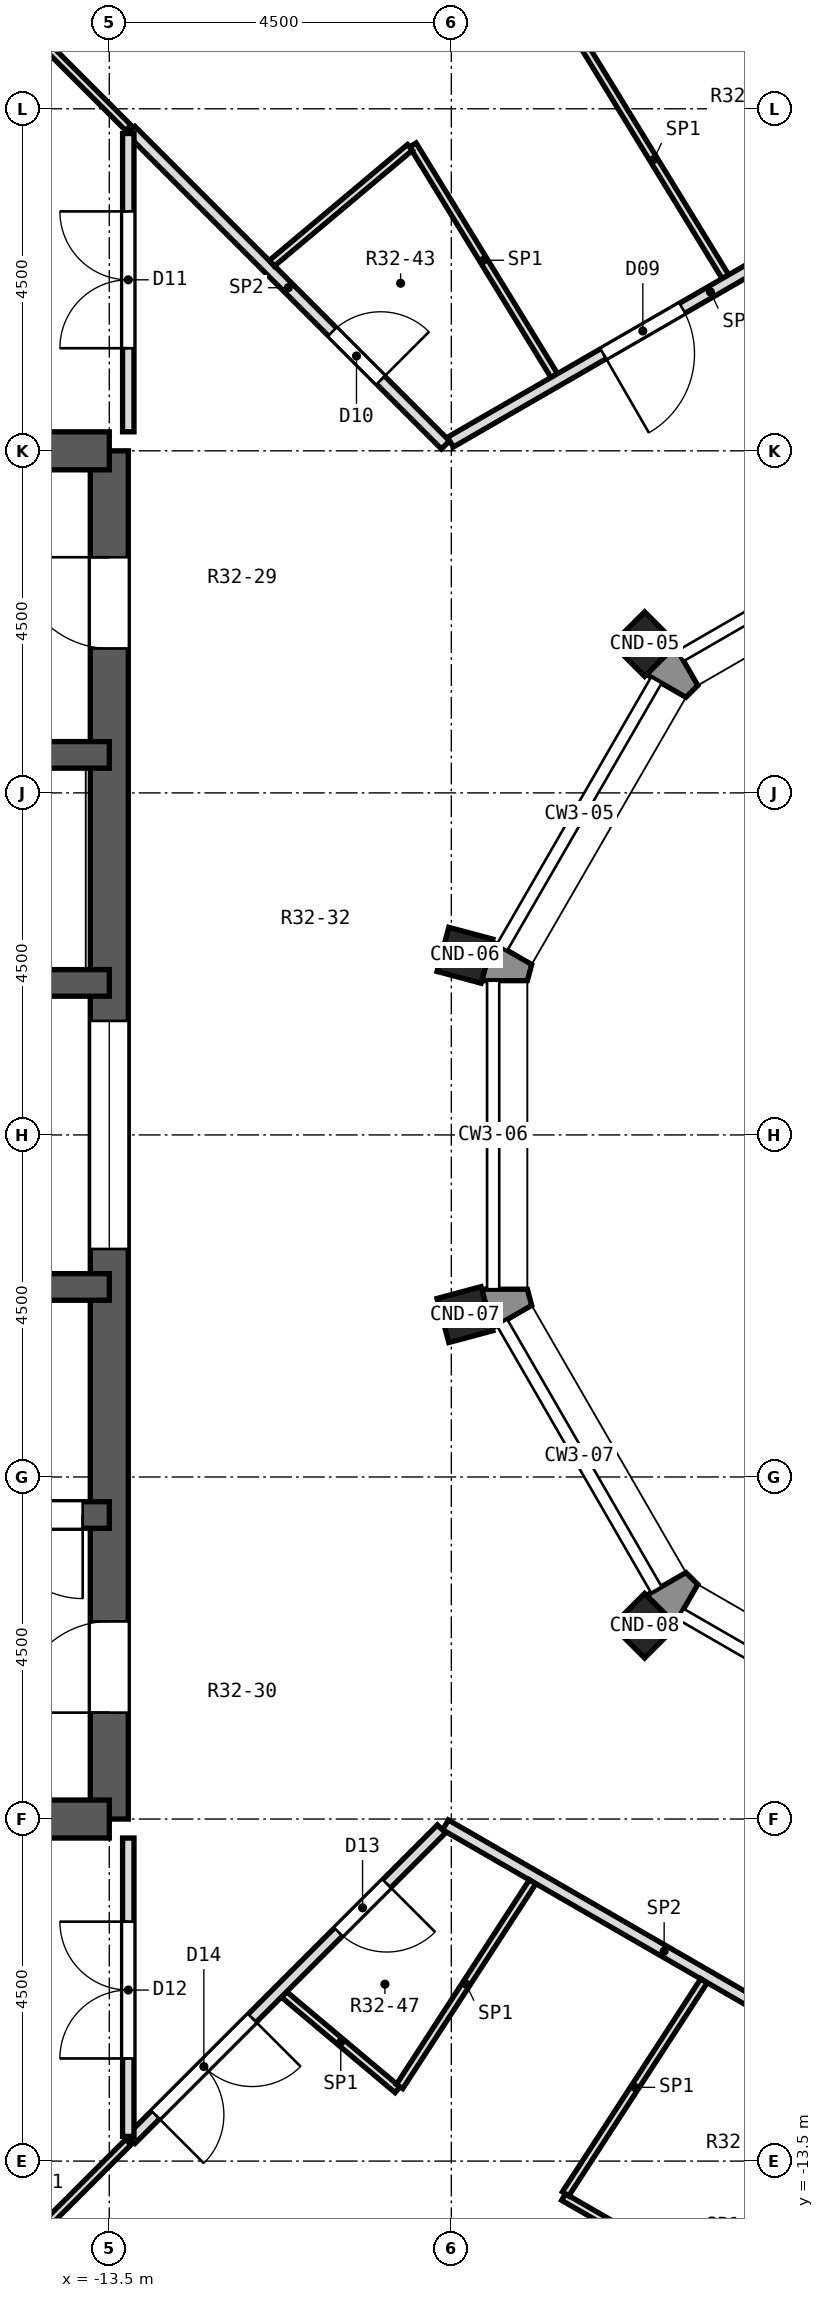
"""IFC4 building model, lengths in metres.
Left out: names, types, materials, properties, quantities, classifications, styles, units other than length and angle.
Written with IfcOpenShell. Run it as: python <this file> out.ifc"""

import sys

from ifc_helpers import new_model, si_unit, direction, frame, frame_2d, origin, origin_2d, place, context, subcontext, project, spatial, polyline, rectangle, outline, extrude, element, fill, save


model = new_model("IFC4")
c1 = context("Model", 3, precision=1e-05, world=origin(), true_north=direction((0.0, 1.0)))
c2 = subcontext(c1, "Body", "Model", "MODEL_VIEW")
j1 = project(units=[si_unit("LENGTHUNIT", "METRE"), si_unit("PLANEANGLEUNIT", "RADIAN")], contexts=[c1])
p1 = place(None, origin())
s1 = spatial("IfcSite", under=j1, at=p1, CompositionType="ELEMENT")
p2 = place(p1, origin())
s2 = spatial("IfcBuilding", under=s1, at=p2, CompositionType="ELEMENT")
p3 = place(p2, frame((0.0, 0.0, 224.7)))
s3 = spatial("IfcBuildingStorey", under=s2, at=p3, CompositionType="ELEMENT", Elevation=224.7)
for number, where, z_axis, x_axis in (
    (1, (-6.458, 6.458, 0.0), (0.0, 0.0, 1.0), (-0.707, 0.707, 0.0)),
    (2, (-8.821, 2.364, 0.0), (0.0, 0.0, 1.0), (-0.966, 0.259, 0.0)),
    (3, (-8.821, -2.364, 0.0), (0.0, 0.0, 1.0), (-0.966, -0.259, 0.0)),
    (4, (-6.458, -6.458, 0.0), (0.0, 0.0, 1.0), (-0.707, -0.707, 0.0)),
):
    element("IfcColumn", number, at=place(p3, frame(where, z_axis=z_axis, x_axis=x_axis)), inside=s3, PredefinedType="COLUMN", context=c2, shape_type="SweptSolid", body=[
        extrude(rectangle(XDim=0.6, YDim=0.6, at=origin_2d()), origin(), (0.0, 0.0, 1.0), 5.0),
    ])
p4 = place(p3, frame((-13.5, -9.0, 0.0), z_axis=(0.0, 0.0, 1.0), x_axis=(0.0, 1.0, 0.0)))
e5 = element("IfcWall", 5, at=p4, inside=s3, PredefinedType="SHEAR", context=c2, shape_type="SweptSolid", body=[
    extrude(rectangle(XDim=18.0, YDim=0.5, at=frame_2d((9.0, 0.0))), origin(), (0.0, 0.0, 1.0), 5.0),
])
p5 = place(p4, frame((15.4, 0.0, 0.0)))
e6 = element("IfcOpeningElement", 6, at=p5, cuts=e5, PredefinedType="OPENING", context=c2, shape_type="SweptSolid", body=[
    extrude(rectangle(XDim=1.2, YDim=2.1, at=frame_2d((0.6, 1.05))), frame((0.0, 0.262, 0.0), z_axis=(0.0, -1.0, 0.0), x_axis=(1.0, 0.0, 0.0)), (0.0, 0.0, 1.0), 0.524),
])
p6 = place(p4, frame((1.4, 0.0, 0.0)))
e7 = element("IfcOpeningElement", 7, at=p6, cuts=e5, PredefinedType="OPENING", context=c2, shape_type="SweptSolid", body=[
    extrude(rectangle(XDim=1.2, YDim=2.1, at=frame_2d((0.6, 1.05))), frame((0.0, 0.262, 0.0), z_axis=(0.0, -1.0, 0.0), x_axis=(1.0, 0.0, 0.0)), (0.0, 0.0, 1.0), 0.524),
])
p7 = place(p4, frame((7.5, 0.0, 0.0)))
e8 = element("IfcOpeningElement", 8, at=p7, cuts=e5, PredefinedType="OPENING", context=c2, shape_type="SweptSolid", body=[
    extrude(rectangle(XDim=3.0, YDim=2.4, at=frame_2d((1.5, 1.2))), frame((0.0, 0.262, 0.0), z_axis=(0.0, -1.0, 0.0), x_axis=(1.0, 0.0, 0.0)), (0.0, 0.0, 1.0), 0.524),
])
for number, where, z_axis, x_axis in (
    (9, (-13.5, 9.0, 0.0), (0.0, 0.0, 1.0), (-1.0, 0.0, 0.0)),
    (10, (-13.5, -9.0, 0.0), (0.0, 0.0, 1.0), (-1.0, 0.0, 0.0)),
):
    element("IfcWall", number, at=place(p3, frame(where, z_axis=z_axis, x_axis=x_axis)), inside=s3, PredefinedType="SHEAR", context=c2, shape_type="SweptSolid", body=[
        extrude(rectangle(XDim=6.0, YDim=0.5, at=frame_2d((3.0, 0.0))), origin(), (0.0, 0.0, 1.0), 5.0),
    ])
p8 = place(p3, frame((-13.5, 5.0, 0.0), z_axis=(0.0, 0.0, 1.0), x_axis=(-1.0, 0.0, 0.0)))
e11 = element("IfcWall", 11, at=p8, inside=s3, PredefinedType="SHEAR", context=c2, shape_type="SweptSolid", body=[
    extrude(rectangle(XDim=6.0, YDim=0.35, at=frame_2d((3.0, 0.0))), origin(), (0.0, 0.0, 1.0), 5.0),
])
p9 = place(p3, frame((-13.5, -5.0, 0.0), z_axis=(0.0, 0.0, 1.0), x_axis=(-1.0, 0.0, 0.0)))
e12 = element("IfcWall", 12, at=p9, inside=s3, PredefinedType="SHEAR", context=c2, shape_type="SweptSolid", body=[
    extrude(rectangle(XDim=6.0, YDim=0.35, at=frame_2d((3.0, 0.0))), origin(), (0.0, 0.0, 1.0), 5.0),
])
p10 = place(p9, frame((0.35, 0.0, 0.0)))
e13 = element("IfcOpeningElement", 13, at=p10, cuts=e12, PredefinedType="OPENING", context=c2, shape_type="SweptSolid", body=[
    extrude(rectangle(XDim=1.1, YDim=2.1, at=frame_2d((0.55, 1.05))), frame((0.0, 0.187, 0.0), z_axis=(0.0, -1.0, 0.0), x_axis=(1.0, 0.0, 0.0)), (0.0, 0.0, 1.0), 0.374),
])
p11 = place(p3, frame((-13.5, 2.0, 0.0), z_axis=(0.0, 0.0, 1.0), x_axis=(-1.0, 0.0, 0.0)))
e14 = element("IfcWall", 14, at=p11, inside=s3, PredefinedType="SHEAR", context=c2, shape_type="SweptSolid", body=[
    extrude(rectangle(XDim=6.0, YDim=0.35, at=frame_2d((3.0, 0.0))), origin(), (0.0, 0.0, 1.0), 5.0),
])
p12 = place(p11, frame((1.37, 0.0, 0.0)))
e15 = element("IfcOpeningElement", 15, at=p12, cuts=e14, PredefinedType="OPENING", context=c2, shape_type="SweptSolid", body=[
    extrude(rectangle(XDim=1.1, YDim=2.1, at=frame_2d((0.55, 1.05))), frame((0.0, 0.187, 0.0), z_axis=(0.0, -1.0, 0.0), x_axis=(1.0, 0.0, 0.0)), (0.0, 0.0, 1.0), 0.374),
])
p13 = place(p11, frame((3.09, 0.0, 0.0)))
e16 = element("IfcOpeningElement", 16, at=p13, cuts=e14, PredefinedType="OPENING", context=c2, shape_type="SweptSolid", body=[
    extrude(rectangle(XDim=1.1, YDim=2.1, at=frame_2d((0.55, 1.05))), frame((0.0, 0.187, 0.0), z_axis=(0.0, -1.0, 0.0), x_axis=(1.0, 0.0, 0.0)), (0.0, 0.0, 1.0), 0.374),
])
p14 = place(p11, frame((5.105, 0.0, 0.0)))
e17 = element("IfcOpeningElement", 17, at=p14, cuts=e14, PredefinedType="OPENING", context=c2, shape_type="SweptSolid", body=[
    extrude(rectangle(XDim=0.6, YDim=2.1, at=frame_2d((0.3, 1.05))), frame((0.0, 0.187, 0.0), z_axis=(0.0, -1.0, 0.0), x_axis=(1.0, 0.0, 0.0)), (0.0, 0.0, 1.0), 0.374),
])
p15 = place(p3, frame((-13.5, -2.0, 0.0), z_axis=(0.0, 0.0, 1.0), x_axis=(-1.0, 0.0, 0.0)))
e18 = element("IfcWall", 18, at=p15, inside=s3, PredefinedType="SHEAR", context=c2, shape_type="SweptSolid", body=[
    extrude(rectangle(XDim=6.0, YDim=0.35, at=frame_2d((3.0, 0.0))), origin(), (0.0, 0.0, 1.0), 5.0),
])
p16 = place(p15, frame((1.14, 0.0, 0.0)))
e19 = element("IfcOpeningElement", 19, at=p16, cuts=e18, PredefinedType="OPENING", context=c2, shape_type="SweptSolid", body=[
    extrude(rectangle(XDim=1.0, YDim=2.1, at=frame_2d((0.5, 1.05))), frame((0.0, 0.187, 0.0), z_axis=(0.0, -1.0, 0.0), x_axis=(1.0, 0.0, 0.0)), (0.0, 0.0, 1.0), 0.374),
])
p17 = place(p3, origin())
e20 = element("IfcWall", 20, at=p17, inside=s3, PredefinedType="SOLIDWALL", context=c2, shape_type="SweptSolid", body=[
    extrude(outline(polyline([(-6.433, 6.058), (-5.914, 5.758), (-5.758, 5.914), (-6.058, 6.433), (-6.433, 6.058)])), origin(), (0.0, 0.0, 1.0), 4.6),
])
p18 = place(p3, origin())
e21 = element("IfcWall", 21, at=p18, inside=s3, PredefinedType="SOLIDWALL", context=c2, shape_type="SweptSolid", body=[
    extrude(outline(polyline([(-8.6, 2.029), (-8.0, 2.029), (-7.943, 2.242), (-8.462, 2.542), (-8.6, 2.029)])), origin(), (0.0, 0.0, 1.0), 4.6),
])
p19 = place(p3, origin())
e22 = element("IfcWall", 22, at=p19, inside=s3, PredefinedType="SOLIDWALL", context=c2, shape_type="SweptSolid", body=[
    extrude(outline(polyline([(-8.462, -2.542), (-7.943, -2.242), (-8.0, -2.029), (-8.6, -2.029), (-8.462, -2.542)])), origin(), (0.0, 0.0, 1.0), 4.6),
])
p20 = place(p3, origin())
e23 = element("IfcWall", 23, at=p20, inside=s3, PredefinedType="SOLIDWALL", context=c2, shape_type="SweptSolid", body=[
    extrude(outline(polyline([(-6.058, -6.433), (-5.758, -5.914), (-5.914, -5.758), (-6.433, -6.058), (-6.058, -6.433)])), origin(), (0.0, 0.0, 1.0), 4.6),
])
p21 = place(p3, frame((-5.646, 21.072, 0.0), z_axis=(0.0, 0.0, 1.0), x_axis=(0.258728835498, -0.965949993365, 0.0)))
e24 = element("IfcWall", 24, at=p21, inside=s3, PredefinedType="PARTITIONING", context=c2, shape_type="SweptSolid", body=[
    extrude(rectangle(XDim=8.978, YDim=0.1, at=frame_2d((4.489, 0.0))), origin(), (0.0, 0.0, 1.0), 4.6),
])
p22 = place(p3, frame((-9.506, 13.024, 0.0), z_axis=(0.0, 0.0, 1.0), x_axis=(0.522634449586, -0.852556879103, 0.0)))
e25 = element("IfcWall", 25, at=p22, inside=s3, PredefinedType="PARTITIONING", context=c2, shape_type="SweptSolid", body=[
    extrude(rectangle(XDim=3.559, YDim=0.1, at=frame_2d((1.779, 0.0))), origin(), (0.0, 0.0, 1.0), 4.6),
])
p23 = place(p3, frame((-7.282, 14.372, 0.0), z_axis=(0.0, 0.0, 1.0), x_axis=(0.522422625175, -0.852686695513, 0.0)))
e26 = element("IfcWall", 26, at=p23, inside=s3, PredefinedType="PARTITIONING", context=c2, shape_type="SweptSolid", body=[
    extrude(rectangle(XDim=3.613, YDim=0.1, at=frame_2d((1.807, 0.0))), origin(), (0.0, 0.0, 1.0), 4.6),
])
p24 = place(p3, frame((-15.426, 15.426, 0.0), z_axis=(0.0, 0.0, 1.0), x_axis=(0.707106781187, -0.707106781187, 0.0)))
e27 = element("IfcWall", 27, at=p24, inside=s3, PredefinedType="PARTITIONING", context=c2, shape_type="SweptSolid", body=[
    extrude(rectangle(XDim=3.077, YDim=0.1, at=frame_2d((1.538, 0.0))), origin(), (0.0, 0.0, 1.0), 4.6),
])
p25 = place(p3, frame((-13.215, 13.215, 0.0), z_axis=(0.0, 0.0, 1.0), x_axis=(0.707106781187, -0.707106781187, 0.0)))
e28 = element("IfcWall", 28, at=p25, inside=s3, PredefinedType="PARTITIONING", context=c2, shape_type="SweptSolid", body=[
    extrude(rectangle(XDim=5.852, YDim=0.15, at=frame_2d((2.926, 0.0))), origin(), (0.0, 0.0, 1.0), 4.6),
])
p26 = place(p25, frame((3.746, 0.0, 0.0)))
e29 = element("IfcOpeningElement", 29, at=p26, cuts=e28, PredefinedType="OPENING", context=c2, shape_type="SweptSolid", body=[
    extrude(rectangle(XDim=0.9, YDim=2.1, at=frame_2d((0.45, 1.05))), frame((0.0, 0.087, 0.0), z_axis=(0.0, -1.0, 0.0), x_axis=(1.0, 0.0, 0.0)), (0.0, 0.0, 1.0), 0.174),
])
p27 = place(p3, frame((-11.202, -11.307, 0.0), z_axis=(0.0, 0.0, 1.0), x_axis=(0.765897191843, -0.642963056114, 0.0)))
e30 = element("IfcWall", 30, at=p27, inside=s3, PredefinedType="PARTITIONING", context=c2, shape_type="SweptSolid", body=[
    extrude(rectangle(XDim=1.95, YDim=0.1, at=frame_2d((0.975, 0.0))), origin(), (0.0, 0.0, 1.0), 4.6),
])
p28 = place(p3, frame((-9.077, -9.077, 0.0), z_axis=(0.0, 0.0, 1.0), x_axis=(0.865961614908, -0.500110469302, 0.0)))
e31 = element("IfcWall", 31, at=p28, inside=s3, PredefinedType="PARTITIONING", context=c2, shape_type="SweptSolid", body=[
    extrude(rectangle(XDim=6.645, YDim=0.15, at=frame_2d((3.322, 0.0))), origin(), (0.0, 0.0, 1.0), 4.6),
])
p29 = place(p28, frame((4.86, 0.0, 0.0)))
e32 = element("IfcOpeningElement", 32, at=p29, cuts=e31, PredefinedType="OPENING", context=c2, shape_type="SweptSolid", body=[
    extrude(rectangle(XDim=0.9, YDim=2.1, at=frame_2d((0.45, 1.05))), frame((0.0, 0.087, 0.0), z_axis=(0.0, -1.0, 0.0), x_axis=(1.0, 0.0, 0.0)), (0.0, 0.0, 1.0), 0.174),
])
p30 = place(p3, frame((-7.524, -13.973, 0.0), z_axis=(0.0, 0.0, 1.0), x_axis=(0.866468987099, -0.499230902886, 0.0)))
e33 = element("IfcWall", 33, at=p30, inside=s3, PredefinedType="PARTITIONING", context=c2, shape_type="SweptSolid", body=[
    extrude(rectangle(XDim=0.917, YDim=0.1, at=frame_2d((0.459, 0.0))), origin(), (0.0, 0.0, 1.0), 4.6),
])
p31 = place(p3, frame((-9.012, 9.115, 0.0), z_axis=(0.0, 0.0, 1.0), x_axis=(0.865967095912, 0.5001009786, 0.0)))
e34 = element("IfcWall", 34, at=p31, inside=s3, PredefinedType="PARTITIONING", context=c2, shape_type="SweptSolid", body=[
    extrude(rectangle(XDim=6.495, YDim=0.15, at=frame_2d((3.248, 0.0))), origin(), (0.0, 0.0, 1.0), 4.6),
])
p32 = place(p31, frame((4.947, 0.0, 0.0)))
e35 = element("IfcOpeningElement", 35, at=p32, cuts=e34, PredefinedType="OPENING", context=c2, shape_type="SweptSolid", body=[
    extrude(rectangle(XDim=0.9, YDim=2.1, at=frame_2d((0.45, 1.05))), frame((0.0, 0.087, 0.0), z_axis=(0.0, -1.0, 0.0), x_axis=(1.0, 0.0, 0.0)), (0.0, 0.0, 1.0), 0.174),
])
p33 = place(p31, frame((2.323, 0.0, 0.0)))
e36 = element("IfcOpeningElement", 36, at=p33, cuts=e34, PredefinedType="OPENING", context=c2, shape_type="SweptSolid", body=[
    extrude(rectangle(XDim=1.2, YDim=2.1, at=frame_2d((0.6, 1.05))), frame((0.0, 0.087, 0.0), z_axis=(0.0, -1.0, 0.0), x_axis=(1.0, 0.0, 0.0)), (0.0, 0.0, 1.0), 0.174),
])
p34 = place(p3, frame((-11.362, 11.467, 0.0), z_axis=(0.0, 0.0, 1.0), x_axis=(0.766108172673, 0.642711652115, 0.0)))
e37 = element("IfcWall", 37, at=p34, inside=s3, PredefinedType="PARTITIONING", context=c2, shape_type="SweptSolid", body=[
    extrude(rectangle(XDim=2.372, YDim=0.1, at=frame_2d((1.186, 0.0))), origin(), (0.0, 0.0, 1.0), 4.6),
])
p35 = place(p3, frame((-15.426, -15.426, 0.0), z_axis=(0.0, 0.0, 1.0), x_axis=(0.707106781187, 0.707106781187, 0.0)))
e38 = element("IfcWall", 38, at=p35, inside=s3, PredefinedType="PARTITIONING", context=c2, shape_type="SweptSolid", body=[
    extrude(rectangle(XDim=3.077, YDim=0.1, at=frame_2d((1.538, 0.0))), origin(), (0.0, 0.0, 1.0), 4.6),
])
p36 = place(p3, frame((-13.215, -13.215, 0.0), z_axis=(0.0, 0.0, 1.0), x_axis=(0.707106781187, 0.707106781187, 0.0)))
e39 = element("IfcWall", 39, at=p36, inside=s3, PredefinedType="PARTITIONING", context=c2, shape_type="SweptSolid", body=[
    extrude(rectangle(XDim=5.777, YDim=0.15, at=frame_2d((2.888, 0.0))), origin(), (0.0, 0.0, 1.0), 4.6),
])
p37 = place(p36, frame((3.859, 0.0, 0.0)))
e40 = element("IfcOpeningElement", 40, at=p37, cuts=e39, PredefinedType="OPENING", context=c2, shape_type="SweptSolid", body=[
    extrude(rectangle(XDim=0.9, YDim=2.1, at=frame_2d((0.45, 1.05))), frame((0.0, 0.087, 0.0), z_axis=(0.0, -1.0, 0.0), x_axis=(1.0, 0.0, 0.0)), (0.0, 0.0, 1.0), 0.174),
])
p38 = place(p36, frame((0.456, 0.0, 0.0)))
e41 = element("IfcOpeningElement", 41, at=p38, cuts=e39, PredefinedType="OPENING", context=c2, shape_type="SweptSolid", body=[
    extrude(rectangle(XDim=1.8, YDim=2.1, at=frame_2d((0.9, 1.05))), frame((0.0, 0.087, 0.0), z_axis=(0.0, -1.0, 0.0), x_axis=(1.0, 0.0, 0.0)), (0.0, 0.0, 1.0), 0.174),
])
p39 = place(p3, frame((-7.497, -13.931, 0.0), z_axis=(0.0, 0.0, 1.0), x_axis=(0.54476755827, 0.838587089966, 0.0)))
e42 = element("IfcWall", 42, at=p39, inside=s3, PredefinedType="PARTITIONING", context=c2, shape_type="SweptSolid", body=[
    extrude(rectangle(XDim=3.343, YDim=0.1, at=frame_2d((1.671, 0.0))), origin(), (0.0, 0.0, 1.0), 4.6),
])
p40 = place(p3, frame((-9.681, -12.519, 0.0), z_axis=(0.0, 0.0, 1.0), x_axis=(0.544873455053, 0.838518287206, 0.0)))
e43 = element("IfcWall", 43, at=p40, inside=s3, PredefinedType="PARTITIONING", context=c2, shape_type="SweptSolid", body=[
    extrude(rectangle(XDim=3.212, YDim=0.1, at=frame_2d((1.606, 0.0))), origin(), (0.0, 0.0, 1.0), 4.6),
])
p41 = place(p3, frame((-5.645, -21.072, 0.0), z_axis=(0.0, 0.0, 1.0), x_axis=(0.258659321195, 0.965968610028, 0.0)))
e44 = element("IfcWall", 44, at=p41, inside=s3, PredefinedType="PARTITIONING", context=c2, shape_type="SweptSolid", body=[
    extrude(rectangle(XDim=8.903, YDim=0.1, at=frame_2d((4.451, 0.0))), origin(), (0.0, 0.0, 1.0), 4.6),
])
p42 = place(p3, frame((-13.25, -13.175, 0.0), z_axis=(0.0, 0.0, 1.0), x_axis=(0.0, 1.0, 0.0)))
e45 = element("IfcWall", 45, at=p42, inside=s3, PredefinedType="PARTITIONING", context=c2, shape_type="SweptSolid", body=[
    extrude(rectangle(XDim=3.925, YDim=0.15, at=frame_2d((1.962, 0.0))), origin(), (0.0, 0.0, 1.0), 4.6),
])
p43 = place(p42, frame((1.025, 0.0, 0.0)))
e46 = element("IfcOpeningElement", 46, at=p43, cuts=e45, PredefinedType="OPENING", context=c2, shape_type="SweptSolid", body=[
    extrude(rectangle(XDim=1.8, YDim=2.1, at=frame_2d((0.9, 1.05))), frame((0.0, 0.087, 0.0), z_axis=(0.0, -1.0, 0.0), x_axis=(1.0, 0.0, 0.0)), (0.0, 0.0, 1.0), 0.174),
])
p44 = place(p3, frame((-13.25, 9.25, 0.0), z_axis=(0.0, 0.0, 1.0), x_axis=(0.0, 1.0, 0.0)))
e47 = element("IfcWall", 47, at=p44, inside=s3, PredefinedType="PARTITIONING", context=c2, shape_type="SweptSolid", body=[
    extrude(rectangle(XDim=3.925, YDim=0.15, at=frame_2d((1.962, 0.0))), origin(), (0.0, 0.0, 1.0), 4.6),
])
p45 = place(p44, frame((1.1, 0.0, 0.0)))
e48 = element("IfcOpeningElement", 48, at=p45, cuts=e47, PredefinedType="OPENING", context=c2, shape_type="SweptSolid", body=[
    extrude(rectangle(XDim=1.8, YDim=2.1, at=frame_2d((0.9, 1.05))), frame((0.0, 0.087, 0.0), z_axis=(0.0, -1.0, 0.0), x_axis=(1.0, 0.0, 0.0)), (0.0, 0.0, 1.0), 0.174),
])
p46 = place(p33, frame((1.2, 0.0, 0.0), z_axis=(0.0, 0.0, 1.0), x_axis=(-1.0, 0.0, 0.0)))
e49 = element("IfcDoor", 49, at=p46, inside=s3, OperationType="SINGLE_SWING_RIGHT", PredefinedType="DOOR", context=c2, shape_type="SweptSolid", body=[
    extrude(rectangle(XDim=1.2, YDim=2.1, at=frame_2d((0.6, 1.05))), frame((0.0, 0.025, 0.0), z_axis=(0.0, -1.0, 0.0), x_axis=(1.0, 0.0, 0.0)), (0.0, 0.0, 1.0), 0.05),
])
fill(e36, e49)
p47 = place(p26, origin())
e50 = element("IfcDoor", 50, at=p47, inside=s3, OperationType="SINGLE_SWING_RIGHT", PredefinedType="DOOR", context=c2, shape_type="SweptSolid", body=[
    extrude(rectangle(XDim=0.9, YDim=2.1, at=frame_2d((0.45, 1.05))), frame((0.0, 0.025, 0.0), z_axis=(0.0, -1.0, 0.0), x_axis=(1.0, 0.0, 0.0)), (0.0, 0.0, 1.0), 0.05),
])
fill(e29, e50)
p48 = place(p45, origin())
e51 = element("IfcDoor", 51, at=p48, inside=s3, OperationType="DOUBLE_DOOR_SINGLE_SWING", PredefinedType="DOOR", context=c2, shape_type="SweptSolid", body=[
    extrude(rectangle(XDim=1.8, YDim=2.1, at=frame_2d((0.9, 1.05))), frame((0.0, 0.025, 0.0), z_axis=(0.0, -1.0, 0.0), x_axis=(1.0, 0.0, 0.0)), (0.0, 0.0, 1.0), 0.05),
])
fill(e48, e51)
p49 = place(p43, origin())
e52 = element("IfcDoor", 52, at=p49, inside=s3, OperationType="DOUBLE_DOOR_SINGLE_SWING", PredefinedType="DOOR", context=c2, shape_type="SweptSolid", body=[
    extrude(rectangle(XDim=1.8, YDim=2.1, at=frame_2d((0.9, 1.05))), frame((0.0, 0.025, 0.0), z_axis=(0.0, -1.0, 0.0), x_axis=(1.0, 0.0, 0.0)), (0.0, 0.0, 1.0), 0.05),
])
fill(e46, e52)
p50 = place(p37, frame((0.9, 0.0, 0.0), z_axis=(0.0, 0.0, 1.0), x_axis=(-1.0, 0.0, 0.0)))
e53 = element("IfcDoor", 53, at=p50, inside=s3, OperationType="SINGLE_SWING_LEFT", PredefinedType="DOOR", context=c2, shape_type="SweptSolid", body=[
    extrude(rectangle(XDim=0.9, YDim=2.1, at=frame_2d((0.45, 1.05))), frame((0.0, 0.025, 0.0), z_axis=(0.0, -1.0, 0.0), x_axis=(1.0, 0.0, 0.0)), (0.0, 0.0, 1.0), 0.05),
])
fill(e40, e53)
p51 = place(p38, frame((1.8, 0.0, 0.0), z_axis=(0.0, 0.0, 1.0), x_axis=(-1.0, 0.0, 0.0)))
e54 = element("IfcDoor", 54, at=p51, inside=s3, OperationType="DOUBLE_DOOR_SINGLE_SWING", PredefinedType="DOOR", context=c2, shape_type="SweptSolid", body=[
    extrude(rectangle(XDim=1.8, YDim=2.1, at=frame_2d((0.9, 1.05))), frame((0.0, 0.025, 0.0), z_axis=(0.0, -1.0, 0.0), x_axis=(1.0, 0.0, 0.0)), (0.0, 0.0, 1.0), 0.05),
])
fill(e41, e54)
p52 = place(p10, origin())
e55 = element("IfcDoor", 55, at=p52, inside=s3, OperationType="SINGLE_SWING_LEFT", PredefinedType="DOOR", context=c2, shape_type="SweptSolid", body=[
    extrude(rectangle(XDim=1.1, YDim=2.1, at=frame_2d((0.55, 1.05))), frame((0.0, 0.025, 0.0), z_axis=(0.0, -1.0, 0.0), x_axis=(1.0, 0.0, 0.0)), (0.0, 0.0, 1.0), 0.05),
])
fill(e13, e55)
p53 = place(p5, origin())
e56 = element("IfcDoor", 56, at=p53, inside=s3, OperationType="SINGLE_SWING_RIGHT", PredefinedType="DOOR", context=c2, shape_type="SweptSolid", body=[
    extrude(rectangle(XDim=1.2, YDim=2.1, at=frame_2d((0.6, 1.05))), frame((0.0, 0.025, 0.0), z_axis=(0.0, -1.0, 0.0), x_axis=(1.0, 0.0, 0.0)), (0.0, 0.0, 1.0), 0.05),
])
fill(e6, e56)
p54 = place(p6, origin())
e57 = element("IfcDoor", 57, at=p54, inside=s3, OperationType="SINGLE_SWING_LEFT", PredefinedType="DOOR", context=c2, shape_type="SweptSolid", body=[
    extrude(rectangle(XDim=1.2, YDim=2.1, at=frame_2d((0.6, 1.05))), frame((0.0, 0.025, 0.0), z_axis=(0.0, -1.0, 0.0), x_axis=(1.0, 0.0, 0.0)), (0.0, 0.0, 1.0), 0.05),
])
fill(e7, e57)
p55 = place(p7, origin())
e58 = element("IfcDoor", 58, at=p55, inside=s3, OperationType="DOUBLE_DOOR_SLIDING", PredefinedType="DOOR", context=c2, shape_type="SweptSolid", body=[
    extrude(rectangle(XDim=3.0, YDim=2.4, at=frame_2d((1.5, 1.2))), frame((0.0, 0.025, 0.0), z_axis=(0.0, -1.0, 0.0), x_axis=(1.0, 0.0, 0.0)), (0.0, 0.0, 1.0), 0.05),
])
fill(e8, e58)
save(model, sys.argv[1])
